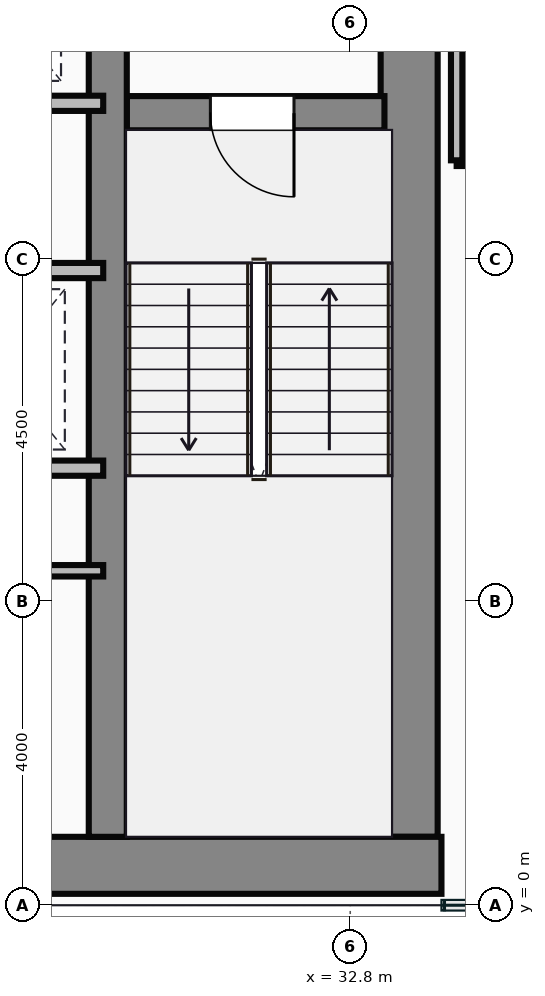
"""IFC4 building model, lengths in metres.
Left out: names, types, materials, properties, quantities, classifications, styles, units other than length and angle.
Written with IfcOpenShell. Run it as: python <this file> out.ifc"""

import sys

from ifc_helpers import new_model, si_unit, direction, frame, frame_2d, origin, place, context, subcontext, project, spatial, rectangle, extrude, source, transform, mapped, element, fill, save


model = new_model("IFC4")
c1 = context("Model", 3, precision=1e-05, world=origin(), true_north=direction((0.0, 1.0)))
c2 = subcontext(c1, "Body", "Model", "MODEL_VIEW")
j1 = project(units=[si_unit("LENGTHUNIT", "METRE"), si_unit("PLANEANGLEUNIT", "RADIAN")], contexts=[c1])
p1 = place(None, origin())
s1 = spatial("IfcSite", under=j1, at=p1, CompositionType="ELEMENT")
p2 = place(p1, origin())
s2 = spatial("IfcBuilding", under=s1, at=p2, CompositionType="ELEMENT")
p3 = place(p2, frame((0.0, 0.0, 169.8)))
s3 = spatial("IfcBuildingStorey", under=s2, at=p3, CompositionType="ELEMENT", Elevation=169.8)
m1 = source(origin(), c2, "Body", "SweptSolid", [
    extrude(rectangle(XDim=29.5, YDim=0.75, at=frame_2d((14.75, 0.0))), origin(), (0.0, 0.0, 1.0), 3.65),
])
p4 = place(p3, frame((4.5, 0.525, 0.0), z_axis=(0.0, 0.0, 1.0), x_axis=(1.0, 0.0, 0.0)))
e1 = element("IfcWall", 1, at=p4, inside=s3, PredefinedType="SHEAR", context=c2, shape_type="MappedRepresentation", body=[
    mapped(m1, transform((0.0, 0.0, 0.0))),
])
m2 = source(origin(), c2, "Body", "SweptSolid", [
    extrude(rectangle(XDim=13.1, YDim=0.75, at=frame_2d((6.55, 0.0))), origin(), (0.0, 0.0, 1.0), 3.65),
])
p5 = place(p3, frame((33.575, 0.9, 0.0), z_axis=(0.0, 0.0, 1.0), x_axis=(0.0, 1.0, 0.0)))
e2 = element("IfcWall", 2, at=p5, inside=s3, PredefinedType="SHEAR", context=c2, shape_type="MappedRepresentation", body=[
    mapped(m2, transform((0.0, 0.0, 0.0))),
])
m3 = source(origin(), c2, "Body", "SweptSolid", [
    extrude(rectangle(XDim=12.35, YDim=0.5, at=frame_2d((6.175, 0.0))), origin(), (0.0, 0.0, 1.0), 3.65),
])
p6 = place(p3, frame((29.61, 0.9, 0.0), z_axis=(0.0, 0.0, 1.0), x_axis=(0.0, 1.0, 0.0)))
e3 = element("IfcWall", 3, at=p6, inside=s3, PredefinedType="SHEAR", context=c2, shape_type="MappedRepresentation", body=[
    mapped(m3, transform((0.0, 0.0, 0.0))),
])
m4 = source(origin(), c2, "Body", "SweptSolid", [
    extrude(rectangle(XDim=3.39, YDim=0.45, at=frame_2d((1.695, 0.0))), origin(), (0.0, 0.0, 1.0), 3.65),
])
p7 = place(p3, frame((29.86, 10.42, 0.0), z_axis=(0.0, 0.0, 1.0), x_axis=(1.0, 0.0, 0.0)))
e4 = element("IfcWall", 4, at=p7, inside=s3, PredefinedType="SHEAR", context=c2, shape_type="MappedRepresentation", body=[
    mapped(m4, transform((0.0, 0.0, 0.0))),
])
p8 = place(p7, frame((1.1, 0.0, 0.0)))
e5 = element("IfcOpeningElement", 5, at=p8, cuts=e4, PredefinedType="OPENING", context=c2, shape_type="SweptSolid", body=[
    extrude(rectangle(XDim=1.1, YDim=2.15, at=frame_2d((0.55, 1.075))), frame((0.0, 0.235, 0.0), z_axis=(0.0, -1.0, 0.0), x_axis=(1.0, 0.0, 0.0)), (0.0, 0.0, 1.0), 0.47),
])
m5 = source(origin(), c2, "Body", "SweptSolid", [
    extrude(rectangle(XDim=8.8, YDim=0.2, at=frame_2d((4.4, 0.0))), origin(), (0.0, 0.0, 1.0), 3.4),
])
p9 = place(p3, frame((20.75, 10.55, 0.0), z_axis=(0.0, 0.0, 1.0), x_axis=(1.0, 0.0, 0.0)))
e6 = element("IfcWall", 6, at=p9, inside=s3, PredefinedType="PARTITIONING", context=c2, shape_type="MappedRepresentation", body=[
    mapped(m5, transform((0.0, 0.0, 0.0))),
])
m6 = source(origin(), c2, "Body", "SweptSolid", [
    extrude(rectangle(XDim=4.55, YDim=0.2, at=frame_2d((2.275, 0.0))), origin(), (0.0, 0.0, 1.0), 3.4),
])
for number, where, z_axis, x_axis in (
    (7, (25.0, 8.35, 0.0), (0.0, 0.0, 1.0), (1.0, 0.0, 0.0)),
    (8, (25.0, 5.75, 0.0), (0.0, 0.0, 1.0), (1.0, 0.0, 0.0)),
):
    element("IfcWall", number, at=place(p3, frame(where, z_axis=z_axis, x_axis=x_axis)), inside=s3, PredefinedType="PARTITIONING", context=c2, shape_type="MappedRepresentation", body=[
        mapped(m6, transform((0.0, 0.0, 0.0))),
    ])
m7 = source(origin(), c2, "Body", "SweptSolid", [
    extrude(rectangle(XDim=4.55, YDim=0.15, at=frame_2d((2.275, 0.0))), origin(), (0.0, 0.0, 1.0), 3.4),
])
p10 = place(p3, frame((25.0, 4.4, 0.0), z_axis=(0.0, 0.0, 1.0), x_axis=(1.0, 0.0, 0.0)))
e9 = element("IfcWall", 9, at=p10, inside=s3, PredefinedType="PARTITIONING", context=c2, shape_type="MappedRepresentation", body=[
    mapped(m7, transform((0.0, 0.0, 0.0))),
])
m8 = source(origin(), c2, "Body", "SweptSolid", [
    extrude(rectangle(XDim=4.8, YDim=0.15, at=frame_2d((2.4, 0.0))), origin(), (0.0, 0.0, 1.0), 3.4),
])
p11 = place(p3, frame((34.2, 9.8, 0.0), z_axis=(0.0, 0.0, 1.0), x_axis=(1.0, 0.0, 0.0)))
e10 = element("IfcWall", 10, at=p11, inside=s3, PredefinedType="PARTITIONING", context=c2, shape_type="MappedRepresentation", body=[
    mapped(m8, transform((0.0, 0.0, 0.0))),
])
m9 = source(origin(), c2, "Body", "SweptSolid", [
    extrude(rectangle(XDim=4.18, YDim=0.15, at=frame_2d((2.09, 0.0))), origin(), (0.0, 0.0, 1.0), 3.4),
])
p12 = place(p3, frame((34.2, 9.8, 0.0), z_axis=(0.0, 0.0, 1.0), x_axis=(0.0, 1.0, 0.0)))
e11 = element("IfcWall", 11, at=p12, inside=s3, PredefinedType="PARTITIONING", context=c2, shape_type="MappedRepresentation", body=[
    mapped(m9, transform((0.0, 0.0, 0.0))),
])
m10 = source(origin(), c2, "Body", "SweptSolid", [
    extrude(rectangle(XDim=1.1, YDim=2.15, at=frame_2d((0.55, 1.075))), frame((0.0, 0.025, 0.0), z_axis=(0.0, -1.0, 0.0), x_axis=(1.0, 0.0, 0.0)), (0.0, 0.0, 1.0), 0.05),
])
p13 = place(p8, frame((1.1, 0.0, 0.0), z_axis=(0.0, 0.0, 1.0), x_axis=(-1.0, 0.0, 0.0)))
e12 = element("IfcDoor", 12, at=p13, inside=s3, OperationType="SINGLE_SWING_RIGHT", PredefinedType="DOOR", context=c2, shape_type="MappedRepresentation", body=[
    mapped(m10, transform((0.0, 0.0, 0.0))),
])
fill(e5, e12)
save(model, sys.argv[1])
